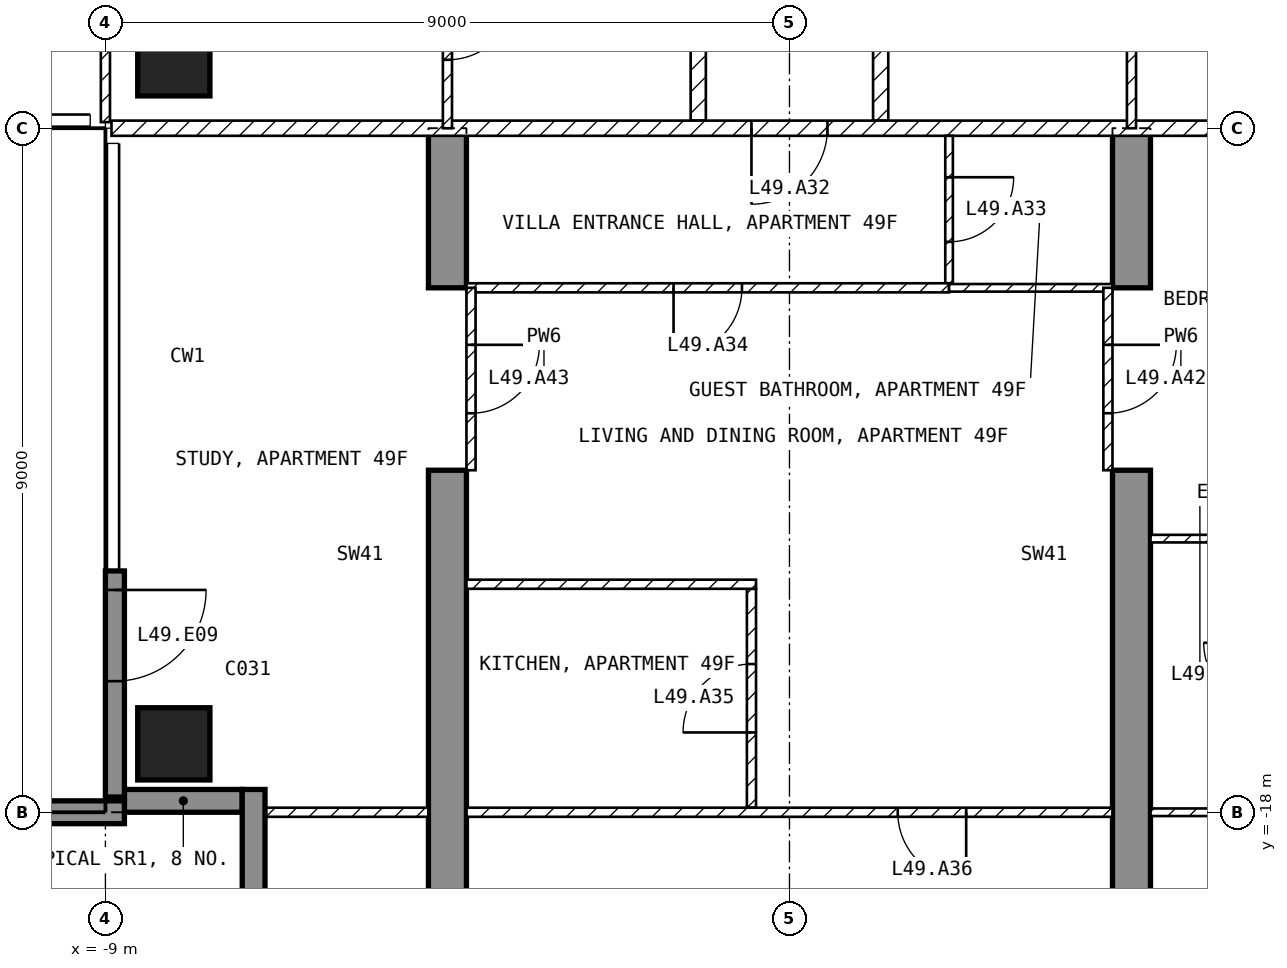
"""IFC4 building model, lengths in metres.
Left out: names, types, materials, properties, quantities, classifications, styles, units other than length and angle.
Written with IfcOpenShell. Run it as: python <this file> out.ifc"""

import sys

from ifc_helpers import new_model, si_unit, direction, frame, frame_2d, origin, origin_2d, place, context, subcontext, project, spatial, polyline, rectangle, outline, extrude, element, fill, save


model = new_model("IFC4")
c1 = context("Model", 3, precision=1e-05, world=origin(), true_north=direction((0.0, 1.0)))
c2 = subcontext(c1, "Body", "Model", "MODEL_VIEW")
j1 = project(units=[si_unit("LENGTHUNIT", "METRE"), si_unit("PLANEANGLEUNIT", "RADIAN")], contexts=[c1])
p1 = place(None, origin())
s1 = spatial("IfcSite", under=j1, at=p1, CompositionType="ELEMENT")
p2 = place(p1, origin())
s2 = spatial("IfcBuilding", under=s1, at=p2, CompositionType="ELEMENT")
p3 = place(p2, frame((0.0, 0.0, 198.1)))
s3 = spatial("IfcBuildingStorey", under=s2, at=p3, CompositionType="ELEMENT", Elevation=198.1)
for number, where, z_axis, x_axis in (
    (1, (-8.1, -17.1, -0.25), (0.0, 0.0, 1.0), (1.0, 0.0, 0.0)),
    (2, (-8.1, -8.1, -0.25), (0.0, 0.0, 1.0), (1.0, 0.0, 0.0)),
):
    element("IfcColumn", number, at=place(p3, frame(where, z_axis=z_axis, x_axis=x_axis)), inside=s3, PredefinedType="COLUMN", context=c2, shape_type="SweptSolid", body=[
        extrude(rectangle(XDim=0.95, YDim=0.95, at=origin_2d()), origin(), (0.0, 0.0, 1.0), 3.5),
    ])
for number, where, z_axis, x_axis in (
    (3, (-4.75, -20.225, -0.25), (1.0, 0.0, 0.0), (0.0, 1.0, 0.0)),
    (4, (4.25, -20.225, -0.25), (1.0, 0.0, 0.0), (0.0, 1.0, 0.0)),
):
    element("IfcWall", number, at=place(p3, frame(where, z_axis=z_axis, x_axis=x_axis)), inside=s3, PredefinedType="SHEAR", context=c2, shape_type="SweptSolid", body=[
        extrude(outline(polyline([(0.0, 0.0), (6.725, 0.0), (6.725, 2.65), (9.125, 2.65), (9.125, 0.0), (11.225, 0.0), (11.225, 3.5), (0.0, 3.5), (0.0, 0.0)])), origin(), (0.0, 0.0, 1.0), 0.5),
    ])
p4 = place(p3, frame((-8.875, -14.825, 0.0), z_axis=(0.0, 0.0, 1.0), x_axis=(0.0, -1.0, 0.0)))
e5 = element("IfcWall", 5, at=p4, inside=s3, PredefinedType="SOLIDWALL", context=c2, shape_type="SweptSolid", body=[
    extrude(rectangle(XDim=2.975, YDim=0.25, at=frame_2d((1.488, 0.0))), origin(), (0.0, 0.0, 1.0), 3.25),
])
p5 = place(p4, frame((0.25, 0.0, 0.0)))
e6 = element("IfcOpeningElement", 6, at=p5, cuts=e5, PredefinedType="OPENING", context=c2, shape_type="SweptSolid", body=[
    extrude(rectangle(XDim=1.2, YDim=2.4, at=frame_2d((0.6, 1.2))), frame((0.0, 0.135, 0.0), z_axis=(0.0, -1.0, 0.0), x_axis=(1.0, 0.0, 0.0)), (0.0, 0.0, 1.0), 0.27),
])
p6 = place(p3, frame((-8.75, -17.85, 0.0), z_axis=(0.0, 0.0, 1.0), x_axis=(1.0, 0.0, 0.0)))
e7 = element("IfcWall", 7, at=p6, inside=s3, PredefinedType="SOLIDWALL", context=c2, shape_type="SweptSolid", body=[
    extrude(rectangle(XDim=1.55, YDim=0.3, at=frame_2d((0.775, 0.0))), origin(), (0.0, 0.0, 1.0), 3.25),
])
p7 = place(p3, frame((-7.05, -17.7, 0.0), z_axis=(0.0, 0.0, 1.0), x_axis=(0.0, -1.0, 0.0)))
e8 = element("IfcWall", 8, at=p7, inside=s3, PredefinedType="SOLIDWALL", context=c2, shape_type="SweptSolid", body=[
    extrude(rectangle(XDim=1.8, YDim=0.3, at=frame_2d((0.9, 0.0))), origin(), (0.0, 0.0, 1.0), 3.25),
])
p8 = place(p3, frame((-8.75, -18.0, 0.0), z_axis=(0.0, 0.0, 1.0), x_axis=(-1.0, 0.0, 0.0)))
e9 = element("IfcWall", 9, at=p8, inside=s3, PredefinedType="SOLIDWALL", context=c2, shape_type="SweptSolid", body=[
    extrude(rectangle(XDim=2.95, YDim=0.3, at=frame_2d((1.475, 0.0))), origin(), (0.0, 0.0, 1.0), 3.25),
])
for number, where, z_axis, x_axis in (
    (10, (1.2, -4.6, 0.0), (0.0, 0.0, 1.0), (0.0, -1.0, 0.0)),
    (11, (-1.2, -8.9, 0.0), (0.0, 0.0, 1.0), (0.0, 1.0, 0.0)),
):
    element("IfcWall", number, at=place(p3, frame(where, z_axis=z_axis, x_axis=x_axis)), inside=s3, PredefinedType="PARTITIONING", context=c2, shape_type="SweptSolid", body=[
        extrude(rectangle(XDim=4.3, YDim=0.2, at=frame_2d((2.15, 0.0))), origin(), (0.0, 0.0, 1.0), 3.25),
    ])
p9 = place(p3, frame((8.92, -9.0, 0.0), z_axis=(0.0, 0.0, 1.0), x_axis=(-1.0, 0.0, 0.0)))
e12 = element("IfcWall", 12, at=p9, inside=s3, PredefinedType="PARTITIONING", context=c2, shape_type="SweptSolid", body=[
    extrude(rectangle(XDim=17.84, YDim=0.2, at=frame_2d((8.92, 0.0))), origin(), (0.0, 0.0, 1.0), 3.25),
])
p10 = place(p9, frame((8.42, 0.0, 0.0)))
e13 = element("IfcOpeningElement", 13, at=p10, cuts=e12, PredefinedType="OPENING", context=c2, shape_type="SweptSolid", body=[
    extrude(rectangle(XDim=1.0, YDim=2.1, at=frame_2d((0.5, 1.05))), frame((0.0, 0.11, 0.0), z_axis=(0.0, -1.0, 0.0), x_axis=(1.0, 0.0, 0.0)), (0.0, 0.0, 1.0), 0.22),
])
p11 = place(p3, frame((4.5, -9.0, 0.0), z_axis=(0.0, 0.0, 1.0), x_axis=(0.0, 1.0, 0.0)))
e14 = element("IfcWall", 14, at=p11, inside=s3, PredefinedType="PARTITIONING", context=c2, shape_type="SweptSolid", body=[
    extrude(rectangle(XDim=4.5, YDim=0.12, at=frame_2d((2.25, 0.0))), origin(), (0.0, 0.0, 1.0), 3.25),
])
p12 = place(p11, frame((1.8, 0.0, 0.0)))
e15 = element("IfcOpeningElement", 15, at=p12, cuts=e14, PredefinedType="OPENING", context=c2, shape_type="SweptSolid", body=[
    extrude(rectangle(XDim=0.9, YDim=2.1, at=frame_2d((0.45, 1.05))), frame((0.0, 0.07, 0.0), z_axis=(0.0, -1.0, 0.0), x_axis=(1.0, 0.0, 0.0)), (0.0, 0.0, 1.0), 0.14),
])
p13 = place(p3, frame((-9.0, -1.3, 0.0), z_axis=(0.0, 0.0, 1.0), x_axis=(0.0, -1.0, 0.0)))
e16 = element("IfcWall", 16, at=p13, inside=s3, PredefinedType="PARTITIONING", context=c2, shape_type="SweptSolid", body=[
    extrude(rectangle(XDim=7.62, YDim=0.12, at=frame_2d((3.81, 0.0))), origin(), (0.0, 0.0, 1.0), 3.25),
])
p14 = place(p13, frame((4.1, 0.0, 0.0)))
e17 = element("IfcOpeningElement", 17, at=p14, cuts=e16, PredefinedType="OPENING", context=c2, shape_type="SweptSolid", body=[
    extrude(rectangle(XDim=0.9, YDim=2.1, at=frame_2d((0.45, 1.05))), frame((0.0, 0.07, 0.0), z_axis=(0.0, -1.0, 0.0), x_axis=(1.0, 0.0, 0.0)), (0.0, 0.0, 1.0), 0.14),
])
p15 = place(p3, frame((-4.5, -6.3, 0.0), z_axis=(0.0, 0.0, 1.0), x_axis=(0.0, -1.0, 0.0)))
e18 = element("IfcWall", 18, at=p15, inside=s3, PredefinedType="PARTITIONING", context=c2, shape_type="SweptSolid", body=[
    extrude(rectangle(XDim=2.7, YDim=0.12, at=frame_2d((1.35, 0.0))), origin(), (0.0, 0.0, 1.0), 3.25),
])
p16 = place(p15, frame((0.9, 0.0, 0.0)))
e19 = element("IfcOpeningElement", 19, at=p16, cuts=e18, PredefinedType="OPENING", context=c2, shape_type="SweptSolid", body=[
    extrude(rectangle(XDim=0.9, YDim=2.1, at=frame_2d((0.45, 1.05))), frame((0.0, 0.07, 0.0), z_axis=(0.0, -1.0, 0.0), x_axis=(1.0, 0.0, 0.0)), (0.0, 0.0, 1.0), 0.14),
])
p17 = place(p3, frame((2.1, -9.1, 0.0), z_axis=(0.0, 0.0, 1.0), x_axis=(0.0, -1.0, 0.0)))
e20 = element("IfcWall", 20, at=p17, inside=s3, PredefinedType="PARTITIONING", context=c2, shape_type="SweptSolid", body=[
    extrude(rectangle(XDim=1.94, YDim=0.1, at=frame_2d((0.97, 0.0))), origin(), (0.0, 0.0, 1.0), 3.25),
])
p18 = place(p17, frame((0.545, 0.0, 0.0)))
e21 = element("IfcOpeningElement", 21, at=p18, cuts=e20, PredefinedType="OPENING", context=c2, shape_type="SweptSolid", body=[
    extrude(rectangle(XDim=0.85, YDim=2.1, at=frame_2d((0.425, 1.05))), frame((0.0, 0.06, 0.0), z_axis=(0.0, -1.0, 0.0), x_axis=(1.0, 0.0, 0.0)), (0.0, 0.0, 1.0), 0.12),
])
p19 = place(p3, frame((2.1, -11.1, 0.0), z_axis=(0.0, 0.0, 1.0), x_axis=(-1.0, 0.0, 0.0)))
e22 = element("IfcWall", 22, at=p19, inside=s3, PredefinedType="PARTITIONING", context=c2, shape_type="SweptSolid", body=[
    extrude(rectangle(XDim=6.35, YDim=0.12, at=frame_2d((3.175, 0.0))), origin(), (0.0, 0.0, 1.0), 3.25),
])
p20 = place(p19, frame((2.725, 0.0, 0.0)))
e23 = element("IfcOpeningElement", 23, at=p20, cuts=e22, PredefinedType="OPENING", context=c2, shape_type="SweptSolid", body=[
    extrude(rectangle(XDim=0.9, YDim=2.1, at=frame_2d((0.45, 1.05))), frame((0.0, 0.07, 0.0), z_axis=(0.0, -1.0, 0.0), x_axis=(1.0, 0.0, 0.0)), (0.0, 0.0, 1.0), 0.14),
])
p21 = place(p3, frame((4.25, -11.1, 0.0), z_axis=(0.0, 0.0, 1.0), x_axis=(-1.0, 0.0, 0.0)))
e24 = element("IfcWall", 24, at=p21, inside=s3, PredefinedType="PARTITIONING", context=c2, shape_type="SweptSolid", body=[
    extrude(rectangle(XDim=2.15, YDim=0.1, at=frame_2d((1.075, 0.0))), origin(), (0.0, 0.0, 1.0), 3.25),
])
p22 = place(p3, frame((-0.5, -17.94, 0.0), z_axis=(0.0, 0.0, 1.0), x_axis=(0.0, 1.0, 0.0)))
e25 = element("IfcWall", 25, at=p22, inside=s3, PredefinedType="PARTITIONING", context=c2, shape_type="SweptSolid", body=[
    extrude(rectangle(XDim=2.88, YDim=0.12, at=frame_2d((1.44, 0.0))), origin(), (0.0, 0.0, 1.0), 3.25),
])
p23 = place(p22, frame((0.99, 0.0, 0.0)))
e26 = element("IfcOpeningElement", 26, at=p23, cuts=e25, PredefinedType="OPENING", context=c2, shape_type="SweptSolid", body=[
    extrude(rectangle(XDim=0.9, YDim=2.1, at=frame_2d((0.45, 1.05))), frame((0.0, 0.07, 0.0), z_axis=(0.0, -1.0, 0.0), x_axis=(1.0, 0.0, 0.0)), (0.0, 0.0, 1.0), 0.14),
])
p24 = place(p3, frame((-0.44, -15.0, 0.0), z_axis=(0.0, 0.0, 1.0), x_axis=(-1.0, 0.0, 0.0)))
e27 = element("IfcWall", 27, at=p24, inside=s3, PredefinedType="PARTITIONING", context=c2, shape_type="SweptSolid", body=[
    extrude(rectangle(XDim=3.81, YDim=0.12, at=frame_2d((1.905, 0.0))), origin(), (0.0, 0.0, 1.0), 3.25),
])
p25 = place(p3, frame((4.25, -18.0, 0.0), z_axis=(0.0, 0.0, 1.0), x_axis=(-1.0, 0.0, 0.0)))
e28 = element("IfcWall", 28, at=p25, inside=s3, PredefinedType="PARTITIONING", context=c2, shape_type="SweptSolid", body=[
    extrude(rectangle(XDim=8.5, YDim=0.12, at=frame_2d((4.25, 0.0))), origin(), (0.0, 0.0, 1.0), 3.25),
])
p26 = place(p25, frame((1.925, 0.0, 0.0)))
e29 = element("IfcOpeningElement", 29, at=p26, cuts=e28, PredefinedType="OPENING", context=c2, shape_type="SweptSolid", body=[
    extrude(rectangle(XDim=0.9, YDim=2.1, at=frame_2d((0.45, 1.05))), frame((0.0, 0.07, 0.0), z_axis=(0.0, -1.0, 0.0), x_axis=(1.0, 0.0, 0.0)), (0.0, 0.0, 1.0), 0.14),
])
p27 = place(p3, frame((6.35, -14.4, 0.0), z_axis=(0.0, 0.0, 1.0), x_axis=(-1.0, 0.0, 0.0)))
e30 = element("IfcWall", 30, at=p27, inside=s3, PredefinedType="PARTITIONING", context=c2, shape_type="SweptSolid", body=[
    extrude(rectangle(XDim=1.6, YDim=0.1, at=frame_2d((0.8, 0.0))), origin(), (0.0, 0.0, 1.0), 3.25),
])
p28 = place(p3, frame((6.3, -18.0, 0.0), z_axis=(0.0, 0.0, 1.0), x_axis=(-1.0, 0.0, 0.0)))
e31 = element("IfcWall", 31, at=p28, inside=s3, PredefinedType="PARTITIONING", context=c2, shape_type="SweptSolid", body=[
    extrude(rectangle(XDim=1.55, YDim=0.1, at=frame_2d((0.775, 0.0))), origin(), (0.0, 0.0, 1.0), 3.25),
])
p29 = place(p3, frame((-4.75, -18.0, 0.0), z_axis=(0.0, 0.0, 1.0), x_axis=(-1.0, 0.0, 0.0)))
e32 = element("IfcWall", 32, at=p29, inside=s3, PredefinedType="PARTITIONING", context=c2, shape_type="SweptSolid", body=[
    extrude(rectangle(XDim=2.37, YDim=0.12, at=frame_2d((1.185, 0.0))), origin(), (0.0, 0.0, 1.0), 3.25),
])
p30 = place(p3, frame((4.19, -11.1, 0.0), z_axis=(0.0, 0.0, 1.0), x_axis=(0.0, -1.0, 0.0)))
e33 = element("IfcWall", 33, at=p30, inside=s3, PredefinedType="PARTITIONING", context=c2, shape_type="SweptSolid", body=[
    extrude(rectangle(XDim=2.4, YDim=0.12, at=frame_2d((1.2, 0.0))), origin(), (0.0, 0.0, 1.0), 2.4),
])
p31 = place(p30, frame((0.75, 0.0, 0.0)))
e34 = element("IfcOpeningElement", 34, at=p31, cuts=e33, PredefinedType="OPENING", context=c2, shape_type="SweptSolid", body=[
    extrude(rectangle(XDim=0.9, YDim=2.1, at=frame_2d((0.45, 1.05))), frame((0.0, 0.07, 0.0), z_axis=(0.0, -1.0, 0.0), x_axis=(1.0, 0.0, 0.0)), (0.0, 0.0, 1.0), 0.14),
])
p32 = place(p3, frame((-4.19, -11.1, 0.0), z_axis=(0.0, 0.0, 1.0), x_axis=(0.0, -1.0, 0.0)))
e35 = element("IfcWall", 35, at=p32, inside=s3, PredefinedType="PARTITIONING", context=c2, shape_type="SweptSolid", body=[
    extrude(rectangle(XDim=2.4, YDim=0.12, at=frame_2d((1.2, 0.0))), origin(), (0.0, 0.0, 1.0), 2.4),
])
p33 = place(p32, frame((0.75, 0.0, 0.0)))
e36 = element("IfcOpeningElement", 36, at=p33, cuts=e35, PredefinedType="OPENING", context=c2, shape_type="SweptSolid", body=[
    extrude(rectangle(XDim=0.9, YDim=2.1, at=frame_2d((0.45, 1.05))), frame((0.0, 0.07, 0.0), z_axis=(0.0, -1.0, 0.0), x_axis=(1.0, 0.0, 0.0)), (0.0, 0.0, 1.0), 0.14),
])
p34 = place(p5, origin())
e37 = element("IfcDoor", 37, at=p34, inside=s3, OperationType="SINGLE_SWING_LEFT", PredefinedType="DOOR", context=c2, shape_type="SweptSolid", body=[
    extrude(rectangle(XDim=1.2, YDim=2.4, at=frame_2d((0.6, 1.2))), frame((0.0, 0.025, 0.0), z_axis=(0.0, -1.0, 0.0), x_axis=(1.0, 0.0, 0.0)), (0.0, 0.0, 1.0), 0.05),
])
fill(e6, e37)
p35 = place(p16, origin())
e38 = element("IfcDoor", 38, at=p35, inside=s3, OperationType="SINGLE_SWING_LEFT", PredefinedType="DOOR", context=c2, shape_type="SweptSolid", body=[
    extrude(rectangle(XDim=0.9, YDim=2.1, at=frame_2d((0.45, 1.05))), frame((0.0, 0.025, 0.0), z_axis=(0.0, -1.0, 0.0), x_axis=(1.0, 0.0, 0.0)), (0.0, 0.0, 1.0), 0.05),
])
fill(e19, e38)
p36 = place(p10, origin())
e39 = element("IfcDoor", 39, at=p36, inside=s3, OperationType="SINGLE_SWING_RIGHT", PredefinedType="DOOR", context=c2, shape_type="SweptSolid", body=[
    extrude(rectangle(XDim=1.0, YDim=2.1, at=frame_2d((0.5, 1.05))), frame((0.0, 0.025, 0.0), z_axis=(0.0, -1.0, 0.0), x_axis=(1.0, 0.0, 0.0)), (0.0, 0.0, 1.0), 0.05),
])
fill(e13, e39)
p37 = place(p18, origin())
e40 = element("IfcDoor", 40, at=p37, inside=s3, OperationType="SINGLE_SWING_LEFT", PredefinedType="DOOR", context=c2, shape_type="SweptSolid", body=[
    extrude(rectangle(XDim=0.85, YDim=2.1, at=frame_2d((0.425, 1.05))), frame((0.0, 0.025, 0.0), z_axis=(0.0, -1.0, 0.0), x_axis=(1.0, 0.0, 0.0)), (0.0, 0.0, 1.0), 0.05),
])
fill(e21, e40)
p38 = place(p20, origin())
e41 = element("IfcDoor", 41, at=p38, inside=s3, OperationType="SINGLE_SWING_RIGHT", PredefinedType="DOOR", context=c2, shape_type="SweptSolid", body=[
    extrude(rectangle(XDim=0.9, YDim=2.1, at=frame_2d((0.45, 1.05))), frame((0.0, 0.025, 0.0), z_axis=(0.0, -1.0, 0.0), x_axis=(1.0, 0.0, 0.0)), (0.0, 0.0, 1.0), 0.05),
])
fill(e23, e41)
p39 = place(p23, origin())
e42 = element("IfcDoor", 42, at=p39, inside=s3, OperationType="SINGLE_SWING_LEFT", PredefinedType="DOOR", context=c2, shape_type="SweptSolid", body=[
    extrude(rectangle(XDim=0.9, YDim=2.1, at=frame_2d((0.45, 1.05))), frame((0.0, 0.025, 0.0), z_axis=(0.0, -1.0, 0.0), x_axis=(1.0, 0.0, 0.0)), (0.0, 0.0, 1.0), 0.05),
])
fill(e26, e42)
p40 = place(p26, origin())
e43 = element("IfcDoor", 43, at=p40, inside=s3, OperationType="SINGLE_SWING_LEFT", PredefinedType="DOOR", context=c2, shape_type="SweptSolid", body=[
    extrude(rectangle(XDim=0.9, YDim=2.1, at=frame_2d((0.45, 1.05))), frame((0.0, 0.025, 0.0), z_axis=(0.0, -1.0, 0.0), x_axis=(1.0, 0.0, 0.0)), (0.0, 0.0, 1.0), 0.05),
])
fill(e29, e43)
p41 = place(p31, origin())
e44 = element("IfcDoor", 44, at=p41, inside=s3, OperationType="SINGLE_SWING_LEFT", PredefinedType="DOOR", context=c2, shape_type="SweptSolid", body=[
    extrude(rectangle(XDim=0.9, YDim=2.1, at=frame_2d((0.45, 1.05))), frame((0.0, 0.025, 0.0), z_axis=(0.0, -1.0, 0.0), x_axis=(1.0, 0.0, 0.0)), (0.0, 0.0, 1.0), 0.05),
])
fill(e34, e44)
p42 = place(p33, origin())
e45 = element("IfcDoor", 45, at=p42, inside=s3, OperationType="SINGLE_SWING_LEFT", PredefinedType="DOOR", context=c2, shape_type="SweptSolid", body=[
    extrude(rectangle(XDim=0.9, YDim=2.1, at=frame_2d((0.45, 1.05))), frame((0.0, 0.025, 0.0), z_axis=(0.0, -1.0, 0.0), x_axis=(1.0, 0.0, 0.0)), (0.0, 0.0, 1.0), 0.05),
])
fill(e36, e45)
save(model, sys.argv[1])
